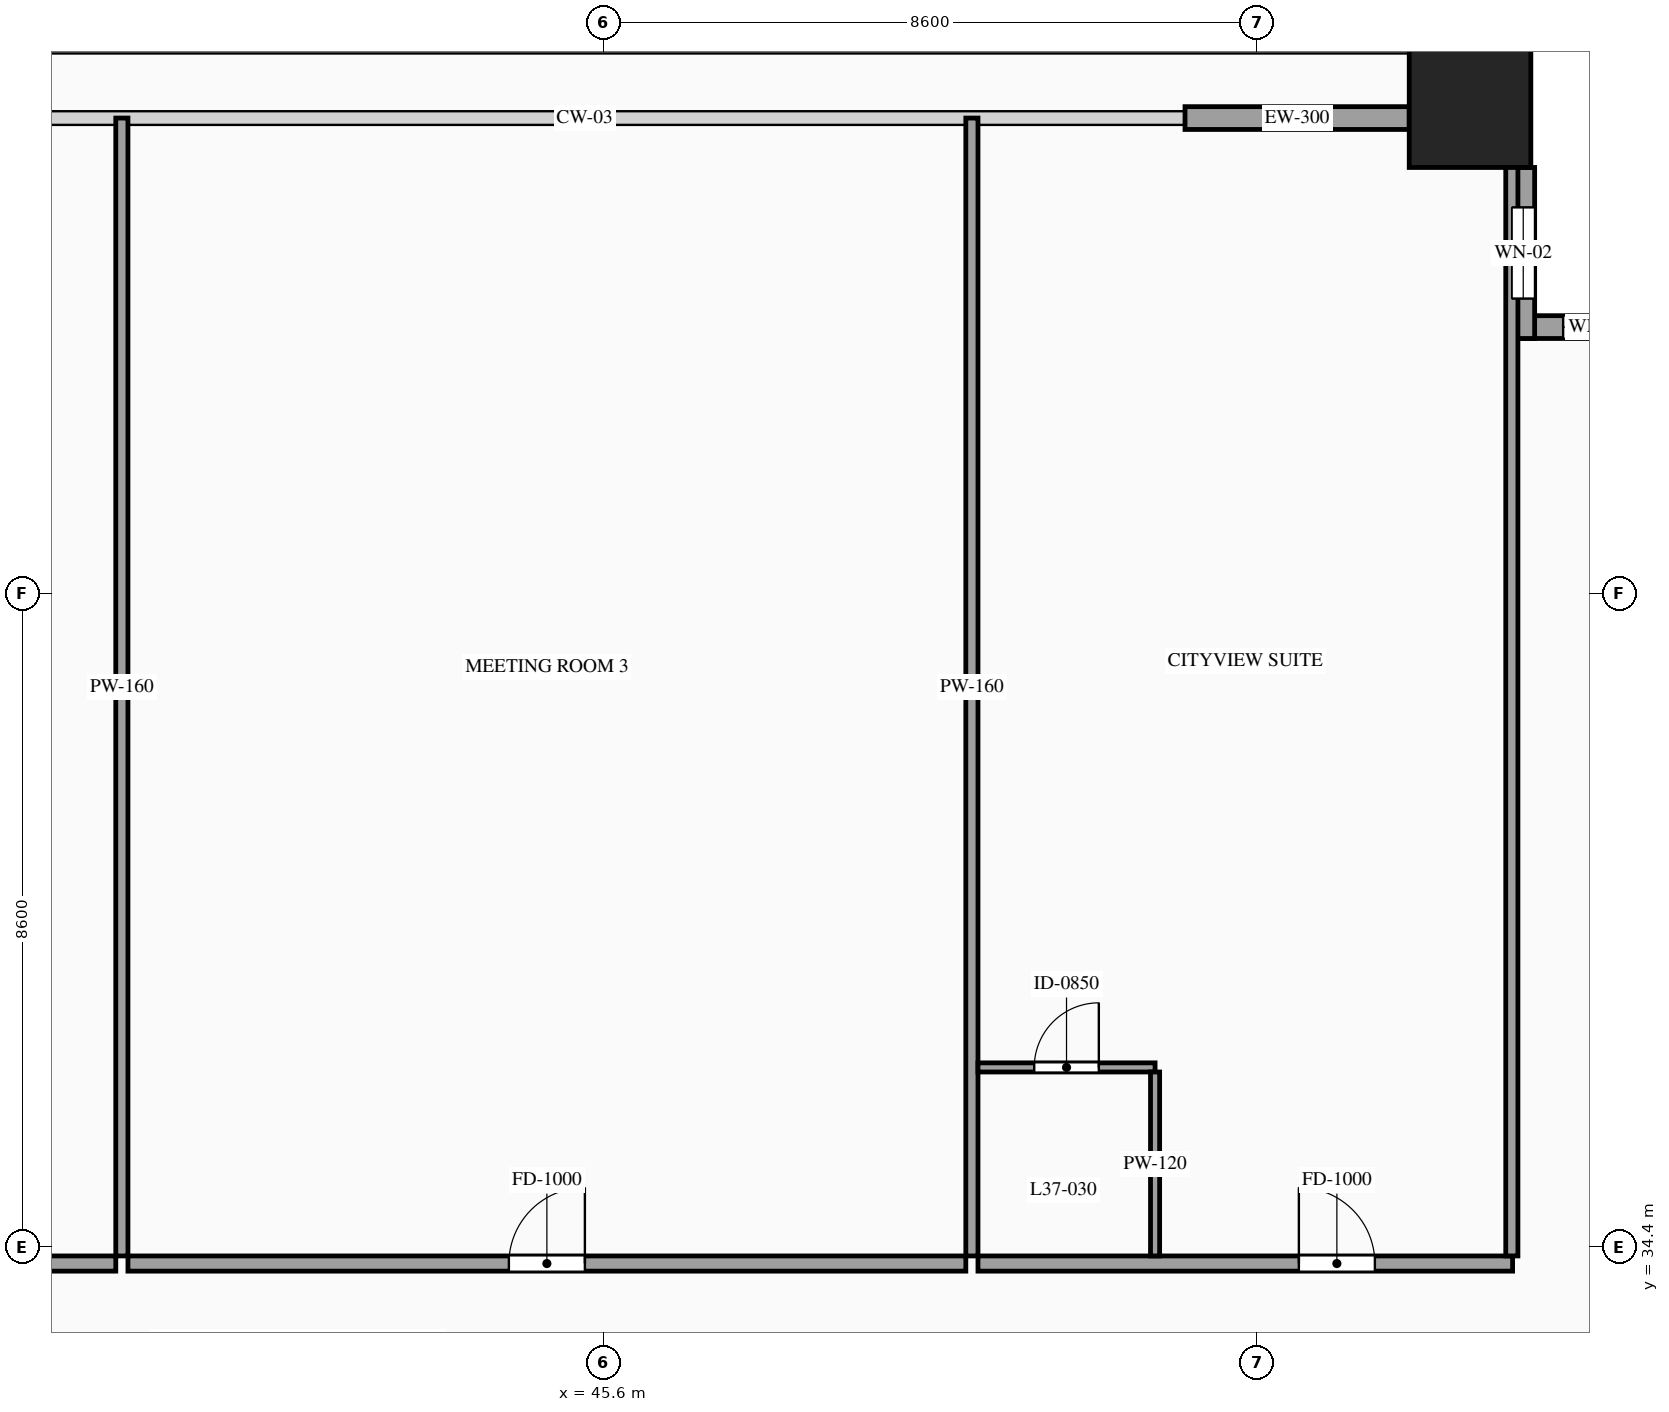
"""IFC4 building model, lengths in metres.
Left out: names, types, materials, properties, quantities, classifications, styles, units other than length and angle.
Written with IfcOpenShell. Run it as: python <this file> out.ifc"""

import sys

from ifc_helpers import new_model, si_unit, direction, frame, frame_2d, origin, origin_2d, place, context, subcontext, project, spatial, rectangle, hollow_rectangle, extrude, source, transform, mapped, element, fill, save


model = new_model("IFC4")
c1 = context("Model", 3, precision=1e-05, world=origin(), true_north=direction((0.0, 1.0)))
c2 = subcontext(c1, "Body", "Model", "MODEL_VIEW")
j1 = project(units=[si_unit("LENGTHUNIT", "METRE"), si_unit("PLANEANGLEUNIT", "RADIAN")], contexts=[c1])
p1 = place(None, origin())
s1 = spatial("IfcSite", under=j1, at=p1, CompositionType="ELEMENT")
p2 = place(p1, origin())
s2 = spatial("IfcBuilding", under=s1, at=p2, CompositionType="ELEMENT")
p3 = place(p2, frame((0.0, 0.0, 141.6)))
s3 = spatial("IfcBuildingStorey", under=s2, at=p3, CompositionType="ELEMENT", Elevation=141.6)
m1 = source(origin(), c2, "Body", "SweptSolid", [
    extrude(hollow_rectangle(XDim=1.6, YDim=1.6, WallThickness=0.07, at=origin_2d()), origin(), (0.0, 0.0, 1.0), 3.6),
])
p4 = place(p3, frame((57.0, 49.4, 0.0), z_axis=(0.0, 0.0, 1.0), x_axis=(1.0, 0.0, 0.0)))
e1 = element("IfcColumn", 1, at=p4, inside=s3, PredefinedType="COLUMN", context=c2, shape_type="MappedRepresentation", body=[
    mapped(m1, transform((0.0, 0.0, 0.0), scale=1.0)),
])
p5 = place(p3, frame((59.8, 46.5, 0.0), z_axis=(0.0, 0.0, 1.0), x_axis=(-1.0, 0.0, 0.0)))
e2 = element("IfcWall", 2, at=p5, inside=s3, PredefinedType="SOLIDWALL", context=c2, shape_type="SweptSolid", body=[
    extrude(rectangle(XDim=2.25, YDim=0.3, at=frame_2d((1.125, 0.0))), origin(), (0.0, 0.0, 1.0), 3.38),
])
p6 = place(p5, frame((0.675, 0.0, 0.85)))
e3 = element("IfcOpeningElement", 3, at=p6, cuts=e2, PredefinedType="OPENING", context=c2, shape_type="SweptSolid", body=[
    extrude(rectangle(XDim=0.9, YDim=1.5, at=frame_2d((0.45, 0.75))), frame((0.0, 0.165, 0.0), z_axis=(0.0, -1.0, 0.0), x_axis=(1.0, 0.0, 0.0)), (0.0, 0.0, 1.0), 0.33),
])
p7 = place(p3, frame((57.7, 46.35, 0.0), z_axis=(0.0, 0.0, 1.0), x_axis=(0.0, 1.0, 0.0)))
e4 = element("IfcWall", 4, at=p7, inside=s3, PredefinedType="SOLIDWALL", context=c2, shape_type="SweptSolid", body=[
    extrude(rectangle(XDim=2.25, YDim=0.3, at=frame_2d((1.125, 0.0))), origin(), (0.0, 0.0, 1.0), 3.38),
])
p8 = place(p7, frame((0.525, 0.0, 0.85)))
e5 = element("IfcOpeningElement", 5, at=p8, cuts=e4, PredefinedType="OPENING", context=c2, shape_type="SweptSolid", body=[
    extrude(rectangle(XDim=1.2, YDim=2.1, at=frame_2d((0.6, 1.05))), frame((0.0, 0.165, 0.0), z_axis=(0.0, -1.0, 0.0), x_axis=(1.0, 0.0, 0.0)), (0.0, 0.0, 1.0), 0.33),
])
m2 = source(origin(), c2, "Body", "SweptSolid", [
    extrude(rectangle(XDim=2.95, YDim=0.3, at=frame_2d((1.475, 0.0))), origin(), (0.0, 0.0, 1.0), 2.775),
])
p9 = place(p3, frame((53.25, 49.25, 0.0), z_axis=(0.0, 0.0, 1.0), x_axis=(1.0, 0.0, 0.0)))
e6 = element("IfcWall", 6, at=p9, inside=s3, PredefinedType="SOLIDWALL", context=c2, shape_type="MappedRepresentation", body=[
    mapped(m2, transform((0.0, 0.0, 0.0), scale=1.0)),
])
p10 = place(p3, frame((34.078, 34.18, 0.0), z_axis=(0.0, 0.0, 1.0), x_axis=(1.0, 0.0, 0.0)))
e7 = element("IfcWall", 7, at=p10, inside=s3, PredefinedType="PARTITIONING", context=c2, shape_type="SweptSolid", body=[
    extrude(rectangle(XDim=5.104, YDim=0.2, at=frame_2d((2.552, 0.0))), origin(), (0.0, 0.0, 1.0), 3.38),
])
p11 = place(p10, frame((2.052, 0.0, 0.0)))
e8 = element("IfcOpeningElement", 8, at=p11, cuts=e7, PredefinedType="OPENING", context=c2, shape_type="SweptSolid", body=[
    extrude(rectangle(XDim=1.0, YDim=2.2, at=frame_2d((0.5, 1.1))), frame((0.0, 0.115, 0.0), z_axis=(0.0, -1.0, 0.0), x_axis=(1.0, 0.0, 0.0)), (0.0, 0.0, 1.0), 0.23),
])
m3 = source(origin(), c2, "Body", "SweptSolid", [
    extrude(rectangle(XDim=14.97, YDim=0.16, at=frame_2d((7.485, 0.0))), origin(), (0.0, 0.0, 1.0), 3.38),
])
p12 = place(p3, frame((39.262, 34.28, 0.0), z_axis=(0.0, 0.0, 1.0), x_axis=(0.0, 1.0, 0.0)))
e9 = element("IfcWall", 9, at=p12, inside=s3, PredefinedType="PARTITIONING", context=c2, shape_type="MappedRepresentation", body=[
    mapped(m3, transform((0.0, 0.0, 0.0), scale=1.0)),
])
p13 = place(p3, frame((39.342, 34.18, 0.0), z_axis=(0.0, 0.0, 1.0), x_axis=(1.0, 0.0, 0.0)))
e10 = element("IfcWall", 10, at=p13, inside=s3, PredefinedType="PARTITIONING", context=c2, shape_type="SweptSolid", body=[
    extrude(rectangle(XDim=11.024, YDim=0.2, at=frame_2d((5.512, 0.0))), origin(), (0.0, 0.0, 1.0), 3.38),
])
p14 = place(p13, frame((5.012, 0.0, 0.0)))
e11 = element("IfcOpeningElement", 11, at=p14, cuts=e10, PredefinedType="OPENING", context=c2, shape_type="SweptSolid", body=[
    extrude(rectangle(XDim=1.0, YDim=2.2, at=frame_2d((0.5, 1.1))), frame((0.0, 0.115, 0.0), z_axis=(0.0, -1.0, 0.0), x_axis=(1.0, 0.0, 0.0)), (0.0, 0.0, 1.0), 0.23),
])
p15 = place(p3, frame((50.446, 34.28, 0.0), z_axis=(0.0, 0.0, 1.0), x_axis=(0.0, 1.0, 0.0)))
e12 = element("IfcWall", 12, at=p15, inside=s3, PredefinedType="PARTITIONING", context=c2, shape_type="MappedRepresentation", body=[
    mapped(m3, transform((0.0, 0.0, 0.0), scale=1.0)),
])
p16 = place(p3, frame((50.526, 34.18, 0.0), z_axis=(0.0, 0.0, 1.0), x_axis=(1.0, 0.0, 0.0)))
e13 = element("IfcWall", 13, at=p16, inside=s3, PredefinedType="PARTITIONING", context=c2, shape_type="SweptSolid", body=[
    extrude(rectangle(XDim=7.034, YDim=0.2, at=frame_2d((3.517, 0.0))), origin(), (0.0, 0.0, 1.0), 3.38),
])
p17 = place(p16, frame((4.222, 0.0, 0.0)))
e14 = element("IfcOpeningElement", 14, at=p17, cuts=e13, PredefinedType="OPENING", context=c2, shape_type="SweptSolid", body=[
    extrude(rectangle(XDim=1.0, YDim=2.2, at=frame_2d((0.5, 1.1))), frame((0.0, 0.115, 0.0), z_axis=(0.0, -1.0, 0.0), x_axis=(1.0, 0.0, 0.0)), (0.0, 0.0, 1.0), 0.23),
])
m4 = source(origin(), c2, "Body", "SweptSolid", [
    extrude(rectangle(XDim=14.82, YDim=0.16, at=frame_2d((7.41, 0.0))), origin(), (0.0, 0.0, 1.0), 3.38),
])
p18 = place(p3, frame((57.55, 34.28, 0.0), z_axis=(0.0, 0.0, 1.0), x_axis=(0.0, 1.0, 0.0)))
e15 = element("IfcWall", 15, at=p18, inside=s3, PredefinedType="PARTITIONING", context=c2, shape_type="MappedRepresentation", body=[
    mapped(m4, transform((0.0, 0.0, 0.0), scale=1.0)),
])
p19 = place(p3, frame((50.526, 36.76, 0.0), z_axis=(0.0, 0.0, 1.0), x_axis=(1.0, 0.0, 0.0)))
e16 = element("IfcWall", 16, at=p19, inside=s3, PredefinedType="PARTITIONING", context=c2, shape_type="SweptSolid", body=[
    extrude(rectangle(XDim=2.33, YDim=0.12, at=frame_2d((1.165, 0.0))), origin(), (0.0, 0.0, 1.0), 3.38),
])
p20 = place(p19, frame((0.74, 0.0, 0.0)))
e17 = element("IfcOpeningElement", 17, at=p20, cuts=e16, PredefinedType="OPENING", context=c2, shape_type="SweptSolid", body=[
    extrude(rectangle(XDim=0.85, YDim=2.1, at=frame_2d((0.425, 1.05))), frame((0.0, 0.075, 0.0), z_axis=(0.0, -1.0, 0.0), x_axis=(1.0, 0.0, 0.0)), (0.0, 0.0, 1.0), 0.15),
])
m5 = source(origin(), c2, "Body", "SweptSolid", [
    extrude(rectangle(XDim=2.42, YDim=0.12, at=frame_2d((1.21, 0.0))), origin(), (0.0, 0.0, 1.0), 3.38),
])
p21 = place(p3, frame((52.856, 34.28, 0.0), z_axis=(0.0, 0.0, 1.0), x_axis=(0.0, 1.0, 0.0)))
e18 = element("IfcWall", 18, at=p21, inside=s3, PredefinedType="PARTITIONING", context=c2, shape_type="MappedRepresentation", body=[
    mapped(m5, transform((0.0, 0.0, 0.0), scale=1.0)),
])
m6 = source(origin(), c2, "Body", "SweptSolid", [
    extrude(rectangle(XDim=0.9, YDim=1.5, at=frame_2d((0.45, 0.75))), frame((0.0, 0.03, 0.0), z_axis=(0.0, -1.0, 0.0), x_axis=(1.0, 0.0, 0.0)), (0.0, 0.0, 1.0), 0.06),
])
p22 = place(p6, origin())
e19 = element("IfcWindow", 19, at=p22, inside=s3, PartitioningType="SINGLE_PANEL", PredefinedType="WINDOW", context=c2, shape_type="MappedRepresentation", body=[
    mapped(m6, transform((0.0, 0.0, 0.0), scale=1.0)),
])
fill(e3, e19)
m7 = source(origin(), c2, "Body", "SweptSolid", [
    extrude(rectangle(XDim=1.2, YDim=2.1, at=frame_2d((0.6, 1.05))), frame((0.0, 0.03, 0.0), z_axis=(0.0, -1.0, 0.0), x_axis=(1.0, 0.0, 0.0)), (0.0, 0.0, 1.0), 0.06),
])
p23 = place(p8, origin())
e20 = element("IfcWindow", 20, at=p23, inside=s3, PartitioningType="SINGLE_PANEL", PredefinedType="WINDOW", context=c2, shape_type="MappedRepresentation", body=[
    mapped(m7, transform((0.0, 0.0, 0.0), scale=1.0)),
])
fill(e5, e20)
m8 = source(origin(), c2, "Body", "SweptSolid", [
    extrude(rectangle(XDim=1.0, YDim=2.2, at=frame_2d((0.5, 1.1))), frame((0.0, 0.025, 0.0), z_axis=(0.0, -1.0, 0.0), x_axis=(1.0, 0.0, 0.0)), (0.0, 0.0, 1.0), 0.05),
])
p24 = place(p14, origin())
e21 = element("IfcDoor", 21, at=p24, inside=s3, OperationType="SINGLE_SWING_RIGHT", PredefinedType="DOOR", context=c2, shape_type="MappedRepresentation", body=[
    mapped(m8, transform((0.0, 0.0, 0.0), scale=1.0)),
])
fill(e11, e21)
p25 = place(p17, origin())
e22 = element("IfcDoor", 22, at=p25, inside=s3, OperationType="SINGLE_SWING_LEFT", PredefinedType="DOOR", context=c2, shape_type="MappedRepresentation", body=[
    mapped(m8, transform((0.0, 0.0, 0.0), scale=1.0)),
])
fill(e14, e22)
m9 = source(origin(), c2, "Body", "SweptSolid", [
    extrude(rectangle(XDim=0.85, YDim=2.1, at=frame_2d((0.425, 1.05))), frame((0.0, 0.025, 0.0), z_axis=(0.0, -1.0, 0.0), x_axis=(1.0, 0.0, 0.0)), (0.0, 0.0, 1.0), 0.05),
])
p26 = place(p20, origin())
e23 = element("IfcDoor", 23, at=p26, inside=s3, OperationType="SINGLE_SWING_RIGHT", PredefinedType="DOOR", context=c2, shape_type="MappedRepresentation", body=[
    mapped(m9, transform((0.0, 0.0, 0.0), scale=1.0)),
])
fill(e17, e23)
save(model, sys.argv[1])
